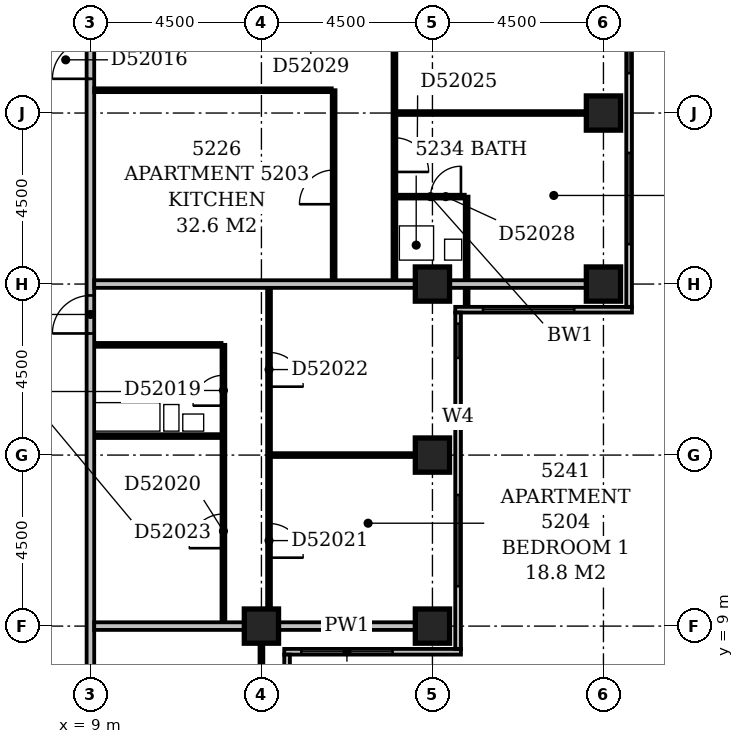
"""IFC4 building model, lengths in metres.
Left out: names, types, materials, properties, quantities, classifications, styles, units other than length and angle.
Written with IfcOpenShell. Run it as: python <this file> out.ifc"""

import sys

from ifc_helpers import new_model, si_unit, direction, frame, frame_2d, origin, origin_2d, place, context, subcontext, project, spatial, rectangle, extrude, element, fill, save


model = new_model("IFC4")
c1 = context("Model", 3, precision=1e-05, world=origin(), true_north=direction((0.0, 1.0)))
c2 = subcontext(c1, "Body", "Model", "MODEL_VIEW")
j1 = project(units=[si_unit("LENGTHUNIT", "METRE"), si_unit("PLANEANGLEUNIT", "RADIAN")], contexts=[c1])
p1 = place(None, origin())
s1 = spatial("IfcSite", under=j1, at=p1, CompositionType="ELEMENT")
p2 = place(p1, origin())
s2 = spatial("IfcBuilding", under=s1, at=p2, CompositionType="ELEMENT")
p3 = place(p2, frame((0.0, 0.0, 204.2)))
s3 = spatial("IfcBuildingStorey", under=s2, at=p3, CompositionType="ELEMENT", Elevation=204.2)
for number, where, z_axis, x_axis in (
    (1, (13.5, 9.0, -0.3), (0.0, 0.0, 1.0), (1.0, 0.0, 0.0)),
    (2, (18.0, 9.0, -0.3), (0.0, 0.0, 1.0), (1.0, 0.0, 0.0)),
    (3, (18.0, 13.5, -0.3), (0.0, 0.0, 1.0), (1.0, 0.0, 0.0)),
    (4, (18.0, 18.0, -0.3), (0.0, 0.0, 1.0), (1.0, 0.0, 0.0)),
    (5, (22.5, 18.0, -0.3), (0.0, 0.0, 1.0), (1.0, 0.0, 0.0)),
    (6, (22.5, 22.5, -0.3), (0.0, 0.0, 1.0), (1.0, 0.0, 0.0)),
):
    element("IfcColumn", number, at=place(p3, frame(where, z_axis=z_axis, x_axis=x_axis)), inside=s3, PredefinedType="COLUMN", context=c2, shape_type="SweptSolid", body=[
        extrude(rectangle(XDim=0.9, YDim=0.9, at=origin_2d()), origin(), (0.0, 0.0, 1.0), 3.6),
    ])
p4 = place(p3, frame((14.175, 3.9, 0.0), z_axis=(0.0, 0.0, 1.0), x_axis=(0.0, 1.0, 0.0)))
e7 = element("IfcWall", 7, at=p4, inside=s3, PredefinedType="STANDARD", context=c2, shape_type="SweptSolid", body=[
    extrude(rectangle(XDim=4.35, YDim=0.15, at=frame_2d((2.175, 0.0))), origin(), (0.0, 0.0, 1.0), 2.7),
])
p5 = place(p4, frame((1.65, 0.0, 0.6)))
e8 = element("IfcOpeningElement", 8, at=p5, cuts=e7, PredefinedType="OPENING", context=c2, shape_type="SweptSolid", body=[
    extrude(rectangle(XDim=2.4, YDim=1.8, at=frame_2d((1.2, 0.9))), frame((0.0, 0.087, 0.0), z_axis=(0.0, -1.0, 0.0), x_axis=(1.0, 0.0, 0.0)), (0.0, 0.0, 1.0), 0.174),
])
p6 = place(p3, frame((14.1, 8.325, 0.0), z_axis=(0.0, 0.0, 1.0), x_axis=(1.0, 0.0, 0.0)))
e9 = element("IfcWall", 9, at=p6, inside=s3, PredefinedType="STANDARD", context=c2, shape_type="SweptSolid", body=[
    extrude(rectangle(XDim=4.65, YDim=0.15, at=frame_2d((2.325, 0.0))), origin(), (0.0, 0.0, 1.0), 2.7),
])
p7 = place(p6, frame((0.45, 0.0, 0.6)))
e10 = element("IfcOpeningElement", 10, at=p7, cuts=e9, PredefinedType="OPENING", context=c2, shape_type="SweptSolid", body=[
    extrude(rectangle(XDim=2.4, YDim=1.8, at=frame_2d((1.2, 0.9))), frame((0.0, 0.087, 0.0), z_axis=(0.0, -1.0, 0.0), x_axis=(1.0, 0.0, 0.0)), (0.0, 0.0, 1.0), 0.174),
])
p8 = place(p3, frame((18.675, 8.4, 0.0), z_axis=(0.0, 0.0, 1.0), x_axis=(0.0, 1.0, 0.0)))
e11 = element("IfcWall", 11, at=p8, inside=s3, PredefinedType="STANDARD", context=c2, shape_type="SweptSolid", body=[
    extrude(rectangle(XDim=8.85, YDim=0.15, at=frame_2d((4.425, 0.0))), origin(), (0.0, 0.0, 1.0), 2.7),
])
p9 = place(p8, frame((1.65, 0.0, 0.6)))
e12 = element("IfcOpeningElement", 12, at=p9, cuts=e11, PredefinedType="OPENING", context=c2, shape_type="SweptSolid", body=[
    extrude(rectangle(XDim=2.4, YDim=1.8, at=frame_2d((1.2, 0.9))), frame((0.0, 0.087, 0.0), z_axis=(0.0, -1.0, 0.0), x_axis=(1.0, 0.0, 0.0)), (0.0, 0.0, 1.0), 0.174),
])
p10 = place(p8, frame((5.807, 0.0, 0.6)))
e13 = element("IfcOpeningElement", 13, at=p10, cuts=e11, PredefinedType="OPENING", context=c2, shape_type="SweptSolid", body=[
    extrude(rectangle(XDim=0.6, YDim=1.8, at=frame_2d((0.3, 0.9))), frame((0.0, 0.087, 0.0), z_axis=(0.0, -1.0, 0.0), x_axis=(1.0, 0.0, 0.0)), (0.0, 0.0, 1.0), 0.174),
])
p11 = place(p8, frame((7.657, 0.0, 0.6)))
e14 = element("IfcOpeningElement", 14, at=p11, cuts=e11, PredefinedType="OPENING", context=c2, shape_type="SweptSolid", body=[
    extrude(rectangle(XDim=0.9, YDim=1.8, at=frame_2d((0.45, 0.9))), frame((0.0, 0.087, 0.0), z_axis=(0.0, -1.0, 0.0), x_axis=(1.0, 0.0, 0.0)), (0.0, 0.0, 1.0), 0.174),
])
p12 = place(p3, frame((18.6, 17.325, 0.0), z_axis=(0.0, 0.0, 1.0), x_axis=(1.0, 0.0, 0.0)))
e15 = element("IfcWall", 15, at=p12, inside=s3, PredefinedType="STANDARD", context=c2, shape_type="SweptSolid", body=[
    extrude(rectangle(XDim=4.65, YDim=0.15, at=frame_2d((2.325, 0.0))), origin(), (0.0, 0.0, 1.0), 2.7),
])
p13 = place(p12, frame((0.731, 0.0, 0.6)))
e16 = element("IfcOpeningElement", 16, at=p13, cuts=e15, PredefinedType="OPENING", context=c2, shape_type="SweptSolid", body=[
    extrude(rectangle(XDim=2.4, YDim=1.8, at=frame_2d((1.2, 0.9))), frame((0.0, 0.087, 0.0), z_axis=(0.0, -1.0, 0.0), x_axis=(1.0, 0.0, 0.0)), (0.0, 0.0, 1.0), 0.174),
])
p14 = place(p3, frame((23.175, 17.4, 0.0), z_axis=(0.0, 0.0, 1.0), x_axis=(0.0, 1.0, 0.0)))
e17 = element("IfcWall", 17, at=p14, inside=s3, PredefinedType="STANDARD", context=c2, shape_type="SweptSolid", body=[
    extrude(rectangle(XDim=17.85, YDim=0.15, at=frame_2d((8.925, 0.0))), origin(), (0.0, 0.0, 1.0), 2.7),
])
p15 = place(p14, frame((1.65, 0.0, 0.6)))
e18 = element("IfcOpeningElement", 18, at=p15, cuts=e17, PredefinedType="OPENING", context=c2, shape_type="SweptSolid", body=[
    extrude(rectangle(XDim=2.4, YDim=1.8, at=frame_2d((1.2, 0.9))), frame((0.0, 0.087, 0.0), z_axis=(0.0, -1.0, 0.0), x_axis=(1.0, 0.0, 0.0)), (0.0, 0.0, 1.0), 0.174),
])
p16 = place(p14, frame((6.15, 0.0, 0.6)))
e19 = element("IfcOpeningElement", 19, at=p16, cuts=e17, PredefinedType="OPENING", context=c2, shape_type="SweptSolid", body=[
    extrude(rectangle(XDim=2.4, YDim=1.8, at=frame_2d((1.2, 0.9))), frame((0.0, 0.087, 0.0), z_axis=(0.0, -1.0, 0.0), x_axis=(1.0, 0.0, 0.0)), (0.0, 0.0, 1.0), 0.174),
])
p17 = place(p14, frame((10.65, 0.0, 0.6)))
e20 = element("IfcOpeningElement", 20, at=p17, cuts=e17, PredefinedType="OPENING", context=c2, shape_type="SweptSolid", body=[
    extrude(rectangle(XDim=2.4, YDim=1.8, at=frame_2d((1.2, 0.9))), frame((0.0, 0.087, 0.0), z_axis=(0.0, -1.0, 0.0), x_axis=(1.0, 0.0, 0.0)), (0.0, 0.0, 1.0), 0.174),
])
p18 = place(p14, frame((15.15, 0.0, 0.6)))
e21 = element("IfcOpeningElement", 21, at=p18, cuts=e17, PredefinedType="OPENING", context=c2, shape_type="SweptSolid", body=[
    extrude(rectangle(XDim=2.4, YDim=1.8, at=frame_2d((1.2, 0.9))), frame((0.0, 0.087, 0.0), z_axis=(0.0, -1.0, 0.0), x_axis=(1.0, 0.0, 0.0)), (0.0, 0.0, 1.0), 0.174),
])
p19 = place(p3, frame((13.5, 4.95, 0.0), z_axis=(0.0, 0.0, 1.0), x_axis=(0.0, 1.0, 0.0)))
e22 = element("IfcWall", 22, at=p19, inside=s3, PredefinedType="PARTITIONING", context=c2, shape_type="SweptSolid", body=[
    extrude(rectangle(XDim=3.6, YDim=0.1, at=frame_2d((1.8, 0.0))), origin(), (0.0, 0.0, 1.0), 2.7),
])
p20 = place(p3, frame((9.0, 5.0, 0.0), z_axis=(0.0, 0.0, 1.0), x_axis=(0.0, 1.0, 0.0)))
e23 = element("IfcWall", 23, at=p20, inside=s3, PredefinedType="PARTITIONING", context=c2, shape_type="SweptSolid", body=[
    extrude(rectangle(XDim=31.0, YDim=0.2, at=frame_2d((15.5, 0.0))), origin(), (0.0, 0.0, 1.0), 3.3),
])
p21 = place(p20, frame((18.4, 0.0, 0.0)))
e24 = element("IfcOpeningElement", 24, at=p21, cuts=e23, PredefinedType="OPENING", context=c2, shape_type="SweptSolid", body=[
    extrude(rectangle(XDim=1.0, YDim=2.1, at=frame_2d((0.5, 1.05))), frame((0.0, 0.112, 0.0), z_axis=(0.0, -1.0, 0.0), x_axis=(1.0, 0.0, 0.0)), (0.0, 0.0, 1.0), 0.224),
])
p22 = place(p20, frame((11.7, 0.0, 0.0)))
e25 = element("IfcOpeningElement", 25, at=p22, cuts=e23, PredefinedType="OPENING", context=c2, shape_type="SweptSolid", body=[
    extrude(rectangle(XDim=1.0, YDim=2.1, at=frame_2d((0.5, 1.05))), frame((0.0, 0.112, 0.0), z_axis=(0.0, -1.0, 0.0), x_axis=(1.0, 0.0, 0.0)), (0.0, 0.0, 1.0), 0.224),
])
p23 = place(p20, frame((1.5, 0.0, 0.0)))
e26 = element("IfcOpeningElement", 26, at=p23, cuts=e23, PredefinedType="OPENING", context=c2, shape_type="SweptSolid", body=[
    extrude(rectangle(XDim=0.9, YDim=2.1, at=frame_2d((0.45, 1.05))), frame((0.0, 0.112, 0.0), z_axis=(0.0, -1.0, 0.0), x_axis=(1.0, 0.0, 0.0)), (0.0, 0.0, 1.0), 0.224),
])
p24 = place(p3, frame((9.1, 9.0, 0.0), z_axis=(0.0, 0.0, 1.0), x_axis=(1.0, 0.0, 0.0)))
e27 = element("IfcWall", 27, at=p24, inside=s3, PredefinedType="PARTITIONING", context=c2, shape_type="SweptSolid", body=[
    extrude(rectangle(XDim=3.95, YDim=0.2, at=frame_2d((1.975, 0.0))), origin(), (0.0, 0.0, 1.0), 3.3),
])
p25 = place(p3, frame((13.95, 9.0, 0.0), z_axis=(0.0, 0.0, 1.0), x_axis=(1.0, 0.0, 0.0)))
e28 = element("IfcWall", 28, at=p25, inside=s3, PredefinedType="PARTITIONING", context=c2, shape_type="SweptSolid", body=[
    extrude(rectangle(XDim=3.6, YDim=0.2, at=frame_2d((1.8, 0.0))), origin(), (0.0, 0.0, 1.0), 2.7),
])
p26 = place(p3, frame((12.5, 9.1, 0.0), z_axis=(0.0, 0.0, 1.0), x_axis=(0.0, 1.0, 0.0)))
e29 = element("IfcWall", 29, at=p26, inside=s3, PredefinedType="PARTITIONING", context=c2, shape_type="SweptSolid", body=[
    extrude(rectangle(XDim=7.3, YDim=0.1, at=frame_2d((3.65, 0.0))), origin(), (0.0, 0.0, 1.0), 3.3),
])
p27 = place(p26, frame((5.7, 0.0, 0.0)))
e30 = element("IfcOpeningElement", 30, at=p27, cuts=e29, PredefinedType="OPENING", context=c2, shape_type="SweptSolid", body=[
    extrude(rectangle(XDim=0.8, YDim=2.1, at=frame_2d((0.4, 1.05))), frame((0.0, 0.062, 0.0), z_axis=(0.0, -1.0, 0.0), x_axis=(1.0, 0.0, 0.0)), (0.0, 0.0, 1.0), 0.124),
])
p28 = place(p26, frame((1.95, 0.0, 0.0)))
e31 = element("IfcOpeningElement", 31, at=p28, cuts=e29, PredefinedType="OPENING", context=c2, shape_type="SweptSolid", body=[
    extrude(rectangle(XDim=0.9, YDim=2.1, at=frame_2d((0.45, 1.05))), frame((0.0, 0.062, 0.0), z_axis=(0.0, -1.0, 0.0), x_axis=(1.0, 0.0, 0.0)), (0.0, 0.0, 1.0), 0.124),
])
p29 = place(p3, frame((13.7, 9.45, 0.0), z_axis=(0.0, 0.0, 1.0), x_axis=(0.0, 1.0, 0.0)))
e32 = element("IfcWall", 32, at=p29, inside=s3, PredefinedType="PARTITIONING", context=c2, shape_type="SweptSolid", body=[
    extrude(rectangle(XDim=8.45, YDim=0.1, at=frame_2d((4.225, 0.0))), origin(), (0.0, 0.0, 1.0), 3.3),
])
p30 = place(p29, frame((1.35, 0.0, 0.0)))
e33 = element("IfcOpeningElement", 33, at=p30, cuts=e32, PredefinedType="OPENING", context=c2, shape_type="SweptSolid", body=[
    extrude(rectangle(XDim=0.9, YDim=2.1, at=frame_2d((0.45, 1.05))), frame((0.0, 0.062, 0.0), z_axis=(0.0, -1.0, 0.0), x_axis=(1.0, 0.0, 0.0)), (0.0, 0.0, 1.0), 0.124),
])
p31 = place(p29, frame((5.85, 0.0, 0.0)))
e34 = element("IfcOpeningElement", 34, at=p31, cuts=e32, PredefinedType="OPENING", context=c2, shape_type="SweptSolid", body=[
    extrude(rectangle(XDim=0.9, YDim=2.1, at=frame_2d((0.45, 1.05))), frame((0.0, 0.062, 0.0), z_axis=(0.0, -1.0, 0.0), x_axis=(1.0, 0.0, 0.0)), (0.0, 0.0, 1.0), 0.124),
])
p32 = place(p3, frame((13.75, 13.5, 0.0), z_axis=(0.0, 0.0, 1.0), x_axis=(1.0, 0.0, 0.0)))
e35 = element("IfcWall", 35, at=p32, inside=s3, PredefinedType="PARTITIONING", context=c2, shape_type="SweptSolid", body=[
    extrude(rectangle(XDim=3.8, YDim=0.1, at=frame_2d((1.9, 0.0))), origin(), (0.0, 0.0, 1.0), 3.3),
])
for number, where, z_axis, x_axis in (
    (36, (9.1, 14.0, 0.0), (0.0, 0.0, 1.0), (1.0, 0.0, 0.0)),
    (37, (9.1, 16.4, 0.0), (0.0, 0.0, 1.0), (1.0, 0.0, 0.0)),
):
    element("IfcWall", number, at=place(p3, frame(where, z_axis=z_axis, x_axis=x_axis)), inside=s3, PredefinedType="PLUMBINGWALL", context=c2, shape_type="SweptSolid", body=[
        extrude(rectangle(XDim=3.35, YDim=0.1, at=frame_2d((1.675, 0.0))), origin(), (0.0, 0.0, 1.0), 3.3),
    ])
p33 = place(p3, frame((18.9, 17.4, 0.0), z_axis=(0.0, 0.0, 1.0), x_axis=(0.0, 1.0, 0.0)))
e38 = element("IfcWall", 38, at=p33, inside=s3, PredefinedType="PLUMBINGWALL", context=c2, shape_type="SweptSolid", body=[
    extrude(rectangle(XDim=2.9, YDim=0.1, at=frame_2d((1.45, 0.0))), origin(), (0.0, 0.0, 1.0), 3.3),
])
p34 = place(p3, frame((9.1, 18.0, 0.0), z_axis=(0.0, 0.0, 1.0), x_axis=(1.0, 0.0, 0.0)))
e39 = element("IfcWall", 39, at=p34, inside=s3, PredefinedType="PARTITIONING", context=c2, shape_type="SweptSolid", body=[
    extrude(rectangle(XDim=8.45, YDim=0.2, at=frame_2d((4.225, 0.0))), origin(), (0.0, 0.0, 1.0), 2.6),
])
p35 = place(p3, frame((18.45, 18.0, 0.0), z_axis=(0.0, 0.0, 1.0), x_axis=(1.0, 0.0, 0.0)))
e40 = element("IfcWall", 40, at=p35, inside=s3, PredefinedType="PARTITIONING", context=c2, shape_type="SweptSolid", body=[
    extrude(rectangle(XDim=3.6, YDim=0.2, at=frame_2d((1.8, 0.0))), origin(), (0.0, 0.0, 1.0), 2.7),
])
p36 = place(p3, frame((15.4, 18.1, 0.0), z_axis=(0.0, 0.0, 1.0), x_axis=(0.0, 1.0, 0.0)))
e41 = element("IfcWall", 41, at=p36, inside=s3, PredefinedType="PARTITIONING", context=c2, shape_type="SweptSolid", body=[
    extrude(rectangle(XDim=5.0, YDim=0.1, at=frame_2d((2.5, 0.0))), origin(), (0.0, 0.0, 1.0), 3.3),
])
p37 = place(p36, frame((2.0, 0.0, 0.0)))
e42 = element("IfcOpeningElement", 42, at=p37, cuts=e41, PredefinedType="OPENING", context=c2, shape_type="SweptSolid", body=[
    extrude(rectangle(XDim=0.9, YDim=2.1, at=frame_2d((0.45, 1.05))), frame((0.0, 0.062, 0.0), z_axis=(0.0, -1.0, 0.0), x_axis=(1.0, 0.0, 0.0)), (0.0, 0.0, 1.0), 0.124),
])
p38 = place(p3, frame((17.0, 18.1, 0.0), z_axis=(0.0, 0.0, 1.0), x_axis=(0.0, 1.0, 0.0)))
e43 = element("IfcWall", 43, at=p38, inside=s3, PredefinedType="PARTITIONING", context=c2, shape_type="SweptSolid", body=[
    extrude(rectangle(XDim=17.8, YDim=0.1, at=frame_2d((8.9, 0.0))), origin(), (0.0, 0.0, 1.0), 3.3),
])
p39 = place(p38, frame((2.85, 0.0, 0.0)))
e44 = element("IfcOpeningElement", 44, at=p39, cuts=e43, PredefinedType="OPENING", context=c2, shape_type="SweptSolid", body=[
    extrude(rectangle(XDim=0.9, YDim=2.1, at=frame_2d((0.45, 1.05))), frame((0.0, 0.062, 0.0), z_axis=(0.0, -1.0, 0.0), x_axis=(1.0, 0.0, 0.0)), (0.0, 0.0, 1.0), 0.124),
])
p40 = place(p38, frame((8.4, 0.0, 0.0)))
e45 = element("IfcOpeningElement", 45, at=p40, cuts=e43, PredefinedType="OPENING", context=c2, shape_type="SweptSolid", body=[
    extrude(rectangle(XDim=0.9, YDim=2.1, at=frame_2d((0.45, 1.05))), frame((0.0, 0.062, 0.0), z_axis=(0.0, -1.0, 0.0), x_axis=(1.0, 0.0, 0.0)), (0.0, 0.0, 1.0), 0.124),
])
p41 = place(p38, frame((14.05, 0.0, 0.0)))
e46 = element("IfcOpeningElement", 46, at=p41, cuts=e43, PredefinedType="OPENING", context=c2, shape_type="SweptSolid", body=[
    extrude(rectangle(XDim=0.9, YDim=2.1, at=frame_2d((0.45, 1.05))), frame((0.0, 0.062, 0.0), z_axis=(0.0, -1.0, 0.0), x_axis=(1.0, 0.0, 0.0)), (0.0, 0.0, 1.0), 0.124),
])
p42 = place(p3, frame((17.05, 20.3, 0.0), z_axis=(0.0, 0.0, 1.0), x_axis=(1.0, 0.0, 0.0)))
e47 = element("IfcWall", 47, at=p42, inside=s3, PredefinedType="PLUMBINGWALL", context=c2, shape_type="SweptSolid", body=[
    extrude(rectangle(XDim=1.8, YDim=0.1, at=frame_2d((0.9, 0.0))), origin(), (0.0, 0.0, 1.0), 3.3),
])
p43 = place(p42, frame((0.9, 0.0, 0.0)))
e48 = element("IfcOpeningElement", 48, at=p43, cuts=e47, PredefinedType="OPENING", context=c2, shape_type="SweptSolid", body=[
    extrude(rectangle(XDim=0.8, YDim=2.1, at=frame_2d((0.4, 1.05))), frame((0.0, 0.062, 0.0), z_axis=(0.0, -1.0, 0.0), x_axis=(1.0, 0.0, 0.0)), (0.0, 0.0, 1.0), 0.124),
])
p44 = place(p3, frame((17.05, 22.5, 0.0), z_axis=(0.0, 0.0, 1.0), x_axis=(1.0, 0.0, 0.0)))
e49 = element("IfcWall", 49, at=p44, inside=s3, PredefinedType="PARTITIONING", context=c2, shape_type="SweptSolid", body=[
    extrude(rectangle(XDim=5.0, YDim=0.1, at=frame_2d((2.5, 0.0))), origin(), (0.0, 0.0, 1.0), 3.3),
])
p45 = place(p3, frame((9.1, 23.1, 0.0), z_axis=(0.0, 0.0, 1.0), x_axis=(1.0, 0.0, 0.0)))
e50 = element("IfcWall", 50, at=p45, inside=s3, PredefinedType="PARTITIONING", context=c2, shape_type="SweptSolid", body=[
    extrude(rectangle(XDim=6.25, YDim=0.1, at=frame_2d((3.125, 0.0))), origin(), (0.0, 0.0, 1.0), 3.3),
])
p46 = place(p7, origin())
e51 = element("IfcWindow", 51, at=p46, inside=s3, PartitioningType="SINGLE_PANEL", PredefinedType="WINDOW", context=c2, shape_type="SweptSolid", body=[
    extrude(rectangle(XDim=2.4, YDim=1.8, at=frame_2d((1.2, 0.9))), frame((0.0, 0.03, 0.0), z_axis=(0.0, -1.0, 0.0), x_axis=(1.0, 0.0, 0.0)), (0.0, 0.0, 1.0), 0.06),
])
fill(e10, e51)
p47 = place(p9, origin())
e52 = element("IfcWindow", 52, at=p47, inside=s3, PartitioningType="SINGLE_PANEL", PredefinedType="WINDOW", context=c2, shape_type="SweptSolid", body=[
    extrude(rectangle(XDim=2.4, YDim=1.8, at=frame_2d((1.2, 0.9))), frame((0.0, 0.03, 0.0), z_axis=(0.0, -1.0, 0.0), x_axis=(1.0, 0.0, 0.0)), (0.0, 0.0, 1.0), 0.06),
])
fill(e12, e52)
p48 = place(p10, origin())
e53 = element("IfcWindow", 53, at=p48, inside=s3, PartitioningType="SINGLE_PANEL", PredefinedType="WINDOW", context=c2, shape_type="SweptSolid", body=[
    extrude(rectangle(XDim=0.6, YDim=1.8, at=frame_2d((0.3, 0.9))), frame((0.0, 0.03, 0.0), z_axis=(0.0, -1.0, 0.0), x_axis=(1.0, 0.0, 0.0)), (0.0, 0.0, 1.0), 0.06),
])
fill(e13, e53)
p49 = place(p11, origin())
e54 = element("IfcWindow", 54, at=p49, inside=s3, PartitioningType="SINGLE_PANEL", PredefinedType="WINDOW", context=c2, shape_type="SweptSolid", body=[
    extrude(rectangle(XDim=0.9, YDim=1.8, at=frame_2d((0.45, 0.9))), frame((0.0, 0.03, 0.0), z_axis=(0.0, -1.0, 0.0), x_axis=(1.0, 0.0, 0.0)), (0.0, 0.0, 1.0), 0.06),
])
fill(e14, e54)
p50 = place(p13, origin())
e55 = element("IfcWindow", 55, at=p50, inside=s3, PartitioningType="SINGLE_PANEL", PredefinedType="WINDOW", context=c2, shape_type="SweptSolid", body=[
    extrude(rectangle(XDim=2.4, YDim=1.8, at=frame_2d((1.2, 0.9))), frame((0.0, 0.03, 0.0), z_axis=(0.0, -1.0, 0.0), x_axis=(1.0, 0.0, 0.0)), (0.0, 0.0, 1.0), 0.06),
])
fill(e16, e55)
p51 = place(p15, origin())
e56 = element("IfcWindow", 56, at=p51, inside=s3, PartitioningType="SINGLE_PANEL", PredefinedType="WINDOW", context=c2, shape_type="SweptSolid", body=[
    extrude(rectangle(XDim=2.4, YDim=1.8, at=frame_2d((1.2, 0.9))), frame((0.0, 0.03, 0.0), z_axis=(0.0, -1.0, 0.0), x_axis=(1.0, 0.0, 0.0)), (0.0, 0.0, 1.0), 0.06),
])
fill(e18, e56)
p52 = place(p16, origin())
e57 = element("IfcWindow", 57, at=p52, inside=s3, PartitioningType="SINGLE_PANEL", PredefinedType="WINDOW", context=c2, shape_type="SweptSolid", body=[
    extrude(rectangle(XDim=2.4, YDim=1.8, at=frame_2d((1.2, 0.9))), frame((0.0, 0.03, 0.0), z_axis=(0.0, -1.0, 0.0), x_axis=(1.0, 0.0, 0.0)), (0.0, 0.0, 1.0), 0.06),
])
fill(e19, e57)
p53 = place(p21, origin())
e58 = element("IfcDoor", 58, at=p53, inside=s3, OperationType="SINGLE_SWING_LEFT", PredefinedType="DOOR", context=c2, shape_type="SweptSolid", body=[
    extrude(rectangle(XDim=1.0, YDim=2.1, at=frame_2d((0.5, 1.05))), frame((0.0, 0.025, 0.0), z_axis=(0.0, -1.0, 0.0), x_axis=(1.0, 0.0, 0.0)), (0.0, 0.0, 1.0), 0.05),
])
fill(e24, e58)
p54 = place(p22, origin())
e59 = element("IfcDoor", 59, at=p54, inside=s3, OperationType="SINGLE_SWING_LEFT", PredefinedType="DOOR", context=c2, shape_type="SweptSolid", body=[
    extrude(rectangle(XDim=1.0, YDim=2.1, at=frame_2d((0.5, 1.05))), frame((0.0, 0.025, 0.0), z_axis=(0.0, -1.0, 0.0), x_axis=(1.0, 0.0, 0.0)), (0.0, 0.0, 1.0), 0.05),
])
fill(e25, e59)
p55 = place(p27, origin())
e60 = element("IfcDoor", 60, at=p55, inside=s3, OperationType="SINGLE_SWING_LEFT", PredefinedType="DOOR", context=c2, shape_type="SweptSolid", body=[
    extrude(rectangle(XDim=0.8, YDim=2.1, at=frame_2d((0.4, 1.05))), frame((0.0, 0.025, 0.0), z_axis=(0.0, -1.0, 0.0), x_axis=(1.0, 0.0, 0.0)), (0.0, 0.0, 1.0), 0.05),
])
fill(e30, e60)
p56 = place(p28, origin())
e61 = element("IfcDoor", 61, at=p56, inside=s3, OperationType="SINGLE_SWING_LEFT", PredefinedType="DOOR", context=c2, shape_type="SweptSolid", body=[
    extrude(rectangle(XDim=0.9, YDim=2.1, at=frame_2d((0.45, 1.05))), frame((0.0, 0.025, 0.0), z_axis=(0.0, -1.0, 0.0), x_axis=(1.0, 0.0, 0.0)), (0.0, 0.0, 1.0), 0.05),
])
fill(e31, e61)
p57 = place(p30, frame((0.9, 0.0, 0.0), z_axis=(0.0, 0.0, 1.0), x_axis=(-1.0, 0.0, 0.0)))
e62 = element("IfcDoor", 62, at=p57, inside=s3, OperationType="SINGLE_SWING_RIGHT", PredefinedType="DOOR", context=c2, shape_type="SweptSolid", body=[
    extrude(rectangle(XDim=0.9, YDim=2.1, at=frame_2d((0.45, 1.05))), frame((0.0, 0.025, 0.0), z_axis=(0.0, -1.0, 0.0), x_axis=(1.0, 0.0, 0.0)), (0.0, 0.0, 1.0), 0.05),
])
fill(e33, e62)
p58 = place(p31, frame((0.9, 0.0, 0.0), z_axis=(0.0, 0.0, 1.0), x_axis=(-1.0, 0.0, 0.0)))
e63 = element("IfcDoor", 63, at=p58, inside=s3, OperationType="SINGLE_SWING_RIGHT", PredefinedType="DOOR", context=c2, shape_type="SweptSolid", body=[
    extrude(rectangle(XDim=0.9, YDim=2.1, at=frame_2d((0.45, 1.05))), frame((0.0, 0.025, 0.0), z_axis=(0.0, -1.0, 0.0), x_axis=(1.0, 0.0, 0.0)), (0.0, 0.0, 1.0), 0.05),
])
fill(e34, e63)
p59 = place(p37, origin())
e64 = element("IfcDoor", 64, at=p59, inside=s3, OperationType="SINGLE_SWING_LEFT", PredefinedType="DOOR", context=c2, shape_type="SweptSolid", body=[
    extrude(rectangle(XDim=0.9, YDim=2.1, at=frame_2d((0.45, 1.05))), frame((0.0, 0.025, 0.0), z_axis=(0.0, -1.0, 0.0), x_axis=(1.0, 0.0, 0.0)), (0.0, 0.0, 1.0), 0.05),
])
fill(e42, e64)
p60 = place(p39, frame((0.9, 0.0, 0.0), z_axis=(0.0, 0.0, 1.0), x_axis=(-1.0, 0.0, 0.0)))
e65 = element("IfcDoor", 65, at=p60, inside=s3, OperationType="SINGLE_SWING_RIGHT", PredefinedType="DOOR", context=c2, shape_type="SweptSolid", body=[
    extrude(rectangle(XDim=0.9, YDim=2.1, at=frame_2d((0.45, 1.05))), frame((0.0, 0.025, 0.0), z_axis=(0.0, -1.0, 0.0), x_axis=(1.0, 0.0, 0.0)), (0.0, 0.0, 1.0), 0.05),
])
fill(e44, e65)
p61 = place(p43, frame((0.8, 0.0, 0.0), z_axis=(0.0, 0.0, 1.0), x_axis=(-1.0, 0.0, 0.0)))
e66 = element("IfcDoor", 66, at=p61, inside=s3, OperationType="SINGLE_SWING_LEFT", PredefinedType="DOOR", context=c2, shape_type="SweptSolid", body=[
    extrude(rectangle(XDim=0.8, YDim=2.1, at=frame_2d((0.4, 1.05))), frame((0.0, 0.025, 0.0), z_axis=(0.0, -1.0, 0.0), x_axis=(1.0, 0.0, 0.0)), (0.0, 0.0, 1.0), 0.05),
])
fill(e48, e66)
save(model, sys.argv[1])
